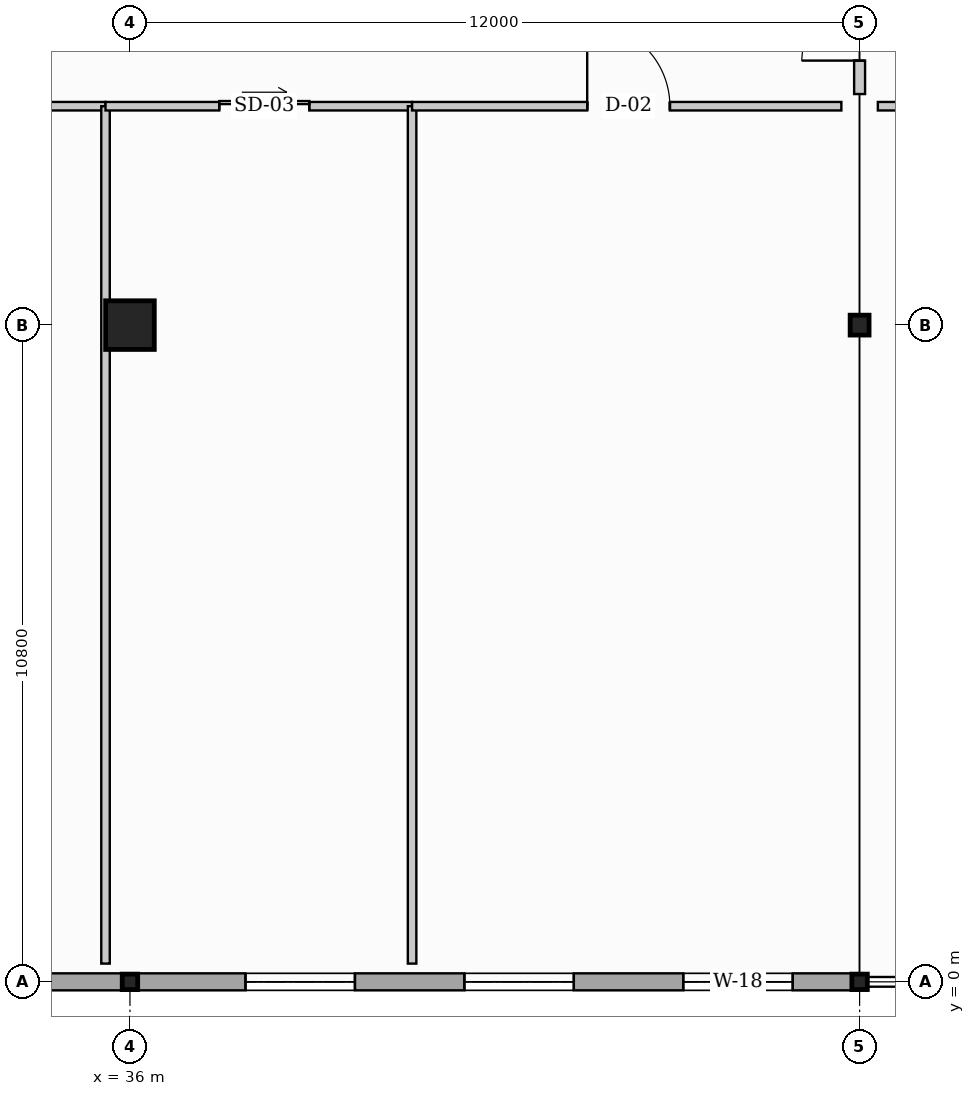
"""IFC4 building model, lengths in metres.
Left out: names, types, materials, properties, quantities, classifications, styles, units other than length and angle.
Written with IfcOpenShell. Run it as: python <this file> out.ifc"""

import sys

from ifc_helpers import new_model, si_unit, direction, frame, frame_2d, origin, origin_2d, place, context, subcontext, project, spatial, rectangle, i_section, extrude, element, fill, save


model = new_model("IFC4")
c1 = context("Model", 3, precision=1e-05, world=origin(), true_north=direction((0.0, 1.0)))
c2 = subcontext(c1, "Body", "Model", "MODEL_VIEW")
j1 = project(units=[si_unit("LENGTHUNIT", "METRE"), si_unit("PLANEANGLEUNIT", "RADIAN")], contexts=[c1])
p1 = place(None, origin())
s1 = spatial("IfcSite", under=j1, at=p1, CompositionType="ELEMENT")
p2 = place(p1, origin())
s2 = spatial("IfcBuilding", under=s1, at=p2, CompositionType="ELEMENT")
p3 = place(p2, origin())
s3 = spatial("IfcBuildingStorey", under=s2, at=p3, CompositionType="ELEMENT", Elevation=0.0)
p4 = place(p3, frame((36.0, 0.0, 0.0), z_axis=(0.0, 0.0, 1.0), x_axis=(0.0, 1.0, 0.0)))
e1 = element("IfcColumn", 1, at=p4, inside=s3, PredefinedType="COLUMN", context=c2, shape_type="SweptSolid", body=[
    extrude(i_section(OverallWidth=0.254, OverallDepth=0.254, WebThickness=0.009, FlangeThickness=0.014, at=origin_2d()), origin(), (0.0, 0.0, 1.0), 4.8),
])
p5 = place(p3, frame((36.0, 10.8, 0.0), z_axis=(0.0, 0.0, 1.0), x_axis=(0.0, 1.0, 0.0)))
e2 = element("IfcColumn", 2, at=p5, inside=s3, PredefinedType="COLUMN", context=c2, shape_type="SweptSolid", body=[
    extrude(rectangle(XDim=0.8, YDim=0.8, at=origin_2d()), origin(), (0.0, 0.0, 1.0), 4.8),
])
p6 = place(p3, frame((48.0, 0.0, 0.0), z_axis=(0.0, 0.0, 1.0), x_axis=(1.0, 0.0, 0.0)))
e3 = element("IfcColumn", 3, at=p6, inside=s3, PredefinedType="COLUMN", context=c2, shape_type="SweptSolid", body=[
    extrude(i_section(OverallWidth=0.254, OverallDepth=0.254, WebThickness=0.009, FlangeThickness=0.014, at=origin_2d()), origin(), (0.0, 0.0, 1.0), 4.8),
])
p7 = place(p3, frame((48.0, 10.8, 0.0), z_axis=(0.0, 0.0, 1.0), x_axis=(1.0, 0.0, 0.0)))
e4 = element("IfcColumn", 4, at=p7, inside=s3, PredefinedType="COLUMN", context=c2, shape_type="SweptSolid", body=[
    extrude(i_section(OverallWidth=0.311, OverallDepth=0.327, WebThickness=0.016, FlangeThickness=0.025, at=origin_2d()), origin(), (0.0, 0.0, 1.0), 4.8),
])
p8 = place(p3, frame((48.0, 0.0, 0.0), z_axis=(0.0, 0.0, 1.0), x_axis=(-1.0, 0.0, 0.0)))
e5 = element("IfcWall", 5, at=p8, inside=s3, PredefinedType="STANDARD", context=c2, shape_type="SweptSolid", body=[
    extrude(rectangle(XDim=48.0, YDim=0.28, at=frame_2d((24.0, 0.0))), origin(), (0.0, 0.0, 1.0), 3.828),
])
p9 = place(p8, frame((1.1, 0.0, 0.95)))
e6 = element("IfcOpeningElement", 6, at=p9, cuts=e5, PredefinedType="OPENING", context=c2, shape_type="SweptSolid", body=[
    extrude(rectangle(XDim=1.8, YDim=0.9, at=frame_2d((0.9, 0.45))), frame((0.0, 0.15, 0.0), z_axis=(0.0, -1.0, 0.0), x_axis=(1.0, 0.0, 0.0)), (0.0, 0.0, 1.0), 0.3),
])
p10 = place(p8, frame((4.7, 0.0, 0.95)))
e7 = element("IfcOpeningElement", 7, at=p10, cuts=e5, PredefinedType="OPENING", context=c2, shape_type="SweptSolid", body=[
    extrude(rectangle(XDim=1.8, YDim=0.9, at=frame_2d((0.9, 0.45))), frame((0.0, 0.15, 0.0), z_axis=(0.0, -1.0, 0.0), x_axis=(1.0, 0.0, 0.0)), (0.0, 0.0, 1.0), 0.3),
])
p11 = place(p8, frame((8.3, 0.0, 0.95)))
e8 = element("IfcOpeningElement", 8, at=p11, cuts=e5, PredefinedType="OPENING", context=c2, shape_type="SweptSolid", body=[
    extrude(rectangle(XDim=1.8, YDim=0.9, at=frame_2d((0.9, 0.45))), frame((0.0, 0.15, 0.0), z_axis=(0.0, -1.0, 0.0), x_axis=(1.0, 0.0, 0.0)), (0.0, 0.0, 1.0), 0.3),
])
p12 = place(p8, frame((15.5, 0.0, 0.95)))
e9 = element("IfcOpeningElement", 9, at=p12, cuts=e5, PredefinedType="OPENING", context=c2, shape_type="SweptSolid", body=[
    extrude(rectangle(XDim=1.8, YDim=0.9, at=frame_2d((0.9, 0.45))), frame((0.0, 0.15, 0.0), z_axis=(0.0, -1.0, 0.0), x_axis=(1.0, 0.0, 0.0)), (0.0, 0.0, 1.0), 0.3),
])
p13 = place(p8, frame((19.1, 0.0, 0.95)))
e10 = element("IfcOpeningElement", 10, at=p13, cuts=e5, PredefinedType="OPENING", context=c2, shape_type="SweptSolid", body=[
    extrude(rectangle(XDim=1.8, YDim=0.9, at=frame_2d((0.9, 0.45))), frame((0.0, 0.15, 0.0), z_axis=(0.0, -1.0, 0.0), x_axis=(1.0, 0.0, 0.0)), (0.0, 0.0, 1.0), 0.3),
])
p14 = place(p8, frame((26.3, 0.0, 0.95)))
e11 = element("IfcOpeningElement", 11, at=p14, cuts=e5, PredefinedType="OPENING", context=c2, shape_type="SweptSolid", body=[
    extrude(rectangle(XDim=1.8, YDim=0.9, at=frame_2d((0.9, 0.45))), frame((0.0, 0.15, 0.0), z_axis=(0.0, -1.0, 0.0), x_axis=(1.0, 0.0, 0.0)), (0.0, 0.0, 1.0), 0.3),
])
p15 = place(p8, frame((29.9, 0.0, 0.95)))
e12 = element("IfcOpeningElement", 12, at=p15, cuts=e5, PredefinedType="OPENING", context=c2, shape_type="SweptSolid", body=[
    extrude(rectangle(XDim=1.8, YDim=0.9, at=frame_2d((0.9, 0.45))), frame((0.0, 0.15, 0.0), z_axis=(0.0, -1.0, 0.0), x_axis=(1.0, 0.0, 0.0)), (0.0, 0.0, 1.0), 0.3),
])
p16 = place(p8, frame((37.1, 0.0, 0.95)))
e13 = element("IfcOpeningElement", 13, at=p16, cuts=e5, PredefinedType="OPENING", context=c2, shape_type="SweptSolid", body=[
    extrude(rectangle(XDim=1.8, YDim=0.9, at=frame_2d((0.9, 0.45))), frame((0.0, 0.15, 0.0), z_axis=(0.0, -1.0, 0.0), x_axis=(1.0, 0.0, 0.0)), (0.0, 0.0, 1.0), 0.3),
])
p17 = place(p8, frame((40.7, 0.0, 0.95)))
e14 = element("IfcOpeningElement", 14, at=p17, cuts=e5, PredefinedType="OPENING", context=c2, shape_type="SweptSolid", body=[
    extrude(rectangle(XDim=1.8, YDim=0.9, at=frame_2d((0.9, 0.45))), frame((0.0, 0.15, 0.0), z_axis=(0.0, -1.0, 0.0), x_axis=(1.0, 0.0, 0.0)), (0.0, 0.0, 1.0), 0.3),
])
p18 = place(p8, frame((44.3, 0.0, 0.95)))
e15 = element("IfcOpeningElement", 15, at=p18, cuts=e5, PredefinedType="OPENING", context=c2, shape_type="SweptSolid", body=[
    extrude(rectangle(XDim=1.8, YDim=0.9, at=frame_2d((0.9, 0.45))), frame((0.0, 0.15, 0.0), z_axis=(0.0, -1.0, 0.0), x_axis=(1.0, 0.0, 0.0)), (0.0, 0.0, 1.0), 0.3),
])
p19 = place(p3, frame((24.504, 14.4, 0.0), z_axis=(0.0, 0.0, 1.0), x_axis=(1.0, 0.0, 0.0)))
e16 = element("IfcWall", 16, at=p19, inside=s3, PredefinedType="PARTITIONING", context=c2, shape_type="SweptSolid", body=[
    extrude(rectangle(XDim=11.094, YDim=0.14, at=frame_2d((5.547, 0.0))), origin(), (0.0, 0.0, 1.0), 4.123),
])
p20 = place(p19, frame((4.897, 0.0, 0.0)))
e17 = element("IfcOpeningElement", 17, at=p20, cuts=e16, PredefinedType="OPENING", context=c2, shape_type="SweptSolid", body=[
    extrude(rectangle(XDim=1.62, YDim=2.3, at=frame_2d((0.81, 1.15))), frame((0.0, 0.08, 0.0), z_axis=(0.0, -1.0, 0.0), x_axis=(1.0, 0.0, 0.0)), (0.0, 0.0, 1.0), 0.16),
])
p21 = place(p3, frame((35.598, 0.3, 0.0), z_axis=(0.0, 0.0, 1.0), x_axis=(0.0, 1.0, 0.0)))
e18 = element("IfcWall", 18, at=p21, inside=s3, PredefinedType="PARTITIONING", context=c2, shape_type="SweptSolid", body=[
    extrude(rectangle(XDim=14.1, YDim=0.14, at=frame_2d((7.05, 0.0))), origin(), (0.0, 0.0, 1.0), 3.823),
])
p22 = place(p3, frame((35.598, 14.4, 0.0), z_axis=(0.0, 0.0, 1.0), x_axis=(1.0, 0.0, 0.0)))
e19 = element("IfcWall", 19, at=p22, inside=s3, PredefinedType="PARTITIONING", context=c2, shape_type="SweptSolid", body=[
    extrude(rectangle(XDim=5.042, YDim=0.14, at=frame_2d((2.521, 0.0))), origin(), (0.0, 0.0, 1.0), 3.97),
])
p23 = place(p22, frame((1.871, 0.0, 0.0)))
e20 = element("IfcOpeningElement", 20, at=p23, cuts=e19, PredefinedType="OPENING", context=c2, shape_type="SweptSolid", body=[
    extrude(rectangle(XDim=1.48, YDim=2.26, at=frame_2d((0.74, 1.13))), frame((0.0, 0.08, 0.0), z_axis=(0.0, -1.0, 0.0), x_axis=(1.0, 0.0, 0.0)), (0.0, 0.0, 1.0), 0.16),
])
p24 = place(p3, frame((40.64, 0.3, 0.0), z_axis=(0.0, 0.0, 1.0), x_axis=(0.0, 1.0, 0.0)))
e21 = element("IfcWall", 21, at=p24, inside=s3, PredefinedType="PARTITIONING", context=c2, shape_type="SweptSolid", body=[
    extrude(rectangle(XDim=14.1, YDim=0.14, at=frame_2d((7.05, 0.0))), origin(), (0.0, 0.0, 1.0), 3.828),
])
p25 = place(p3, frame((40.64, 14.4, 0.0), z_axis=(0.0, 0.0, 1.0), x_axis=(1.0, 0.0, 0.0)))
e22 = element("IfcWall", 22, at=p25, inside=s3, PredefinedType="PARTITIONING", context=c2, shape_type="SweptSolid", body=[
    extrude(rectangle(XDim=7.06, YDim=0.14, at=frame_2d((3.53, 0.0))), origin(), (0.0, 0.0, 1.0), 3.973),
])
p26 = place(p25, frame((2.88, 0.0, 0.0)))
e23 = element("IfcOpeningElement", 23, at=p26, cuts=e22, PredefinedType="OPENING", context=c2, shape_type="SweptSolid", body=[
    extrude(rectangle(XDim=1.36, YDim=2.18, at=frame_2d((0.68, 1.09))), frame((0.0, 0.08, 0.0), z_axis=(0.0, -1.0, 0.0), x_axis=(1.0, 0.0, 0.0)), (0.0, 0.0, 1.0), 0.16),
])
p27 = place(p3, frame((48.0, 14.6, 0.0), z_axis=(0.0, 0.0, 1.0), x_axis=(0.0, 1.0, 0.0)))
e24 = element("IfcWall", 24, at=p27, inside=s3, PredefinedType="PARTITIONING", context=c2, shape_type="SweptSolid", body=[
    extrude(rectangle(XDim=3.0, YDim=0.18, at=frame_2d((1.5, 0.0))), origin(), (0.0, 0.0, 1.0), 3.973),
])
p28 = place(p27, frame((0.55, 0.0, 0.0)))
e25 = element("IfcOpeningElement", 25, at=p28, cuts=e24, PredefinedType="OPENING", context=c2, shape_type="SweptSolid", body=[
    extrude(rectangle(XDim=1.9, YDim=2.25, at=frame_2d((0.95, 1.125))), frame((0.0, 0.1, 0.0), z_axis=(0.0, -1.0, 0.0), x_axis=(1.0, 0.0, 0.0)), (0.0, 0.0, 1.0), 0.2),
])
p29 = place(p3, frame((48.3, 14.4, 0.0), z_axis=(0.0, 0.0, 1.0), x_axis=(1.0, 0.0, 0.0)))
e26 = element("IfcWall", 26, at=p29, inside=s3, PredefinedType="PARTITIONING", context=c2, shape_type="SweptSolid", body=[
    extrude(rectangle(XDim=18.765, YDim=0.14, at=frame_2d((9.382, 0.0))), origin(), (0.0, 0.0, 1.0), 3.973),
])
p30 = place(p29, frame((0.32, 0.0, 0.0)))
e27 = element("IfcOpeningElement", 27, at=p30, cuts=e26, PredefinedType="OPENING", context=c2, shape_type="SweptSolid", body=[
    extrude(rectangle(XDim=1.02, YDim=2.08, at=frame_2d((0.51, 1.04))), frame((0.0, 0.08, 0.0), z_axis=(0.0, -1.0, 0.0), x_axis=(1.0, 0.0, 0.0)), (0.0, 0.0, 1.0), 0.16),
])
p31 = place(p9, origin())
e28 = element("IfcWindow", 28, at=p31, inside=s3, PartitioningType="DOUBLE_PANEL_HORIZONTAL", PredefinedType="WINDOW", context=c2, shape_type="SweptSolid", body=[
    extrude(rectangle(XDim=1.8, YDim=0.9, at=frame_2d((0.9, 0.45))), frame((0.0, 0.03, 0.0), z_axis=(0.0, -1.0, 0.0), x_axis=(1.0, 0.0, 0.0)), (0.0, 0.0, 1.0), 0.06),
])
fill(e6, e28)
p32 = place(p10, origin())
e29 = element("IfcWindow", 29, at=p32, inside=s3, PartitioningType="DOUBLE_PANEL_HORIZONTAL", PredefinedType="WINDOW", context=c2, shape_type="SweptSolid", body=[
    extrude(rectangle(XDim=1.8, YDim=0.9, at=frame_2d((0.9, 0.45))), frame((0.0, 0.03, 0.0), z_axis=(0.0, -1.0, 0.0), x_axis=(1.0, 0.0, 0.0)), (0.0, 0.0, 1.0), 0.06),
])
fill(e7, e29)
p33 = place(p11, origin())
e30 = element("IfcWindow", 30, at=p33, inside=s3, PartitioningType="DOUBLE_PANEL_HORIZONTAL", PredefinedType="WINDOW", context=c2, shape_type="SweptSolid", body=[
    extrude(rectangle(XDim=1.8, YDim=0.9, at=frame_2d((0.9, 0.45))), frame((0.0, 0.03, 0.0), z_axis=(0.0, -1.0, 0.0), x_axis=(1.0, 0.0, 0.0)), (0.0, 0.0, 1.0), 0.06),
])
fill(e8, e30)
p34 = place(p23, origin())
e31 = element("IfcDoor", 31, at=p34, inside=s3, OperationType="SLIDING_TO_LEFT", PredefinedType="DOOR", context=c2, shape_type="SweptSolid", body=[
    extrude(rectangle(XDim=1.48, YDim=2.26, at=frame_2d((0.74, 1.13))), frame((0.0, 0.025, 0.0), z_axis=(0.0, -1.0, 0.0), x_axis=(1.0, 0.0, 0.0)), (0.0, 0.0, 1.0), 0.05),
])
fill(e20, e31)
p35 = place(p26, origin())
e32 = element("IfcDoor", 32, at=p35, inside=s3, OperationType="SINGLE_SWING_LEFT", PredefinedType="DOOR", context=c2, shape_type="SweptSolid", body=[
    extrude(rectangle(XDim=1.36, YDim=2.18, at=frame_2d((0.68, 1.09))), frame((0.0, 0.025, 0.0), z_axis=(0.0, -1.0, 0.0), x_axis=(1.0, 0.0, 0.0)), (0.0, 0.0, 1.0), 0.05),
])
fill(e23, e32)
p36 = place(p28, origin())
e33 = element("IfcDoor", 33, at=p36, inside=s3, OperationType="DOUBLE_DOOR_SINGLE_SWING", PredefinedType="DOOR", context=c2, shape_type="SweptSolid", body=[
    extrude(rectangle(XDim=1.9, YDim=2.25, at=frame_2d((0.95, 1.125))), frame((0.0, 0.025, 0.0), z_axis=(0.0, -1.0, 0.0), x_axis=(1.0, 0.0, 0.0)), (0.0, 0.0, 1.0), 0.05),
])
fill(e25, e33)
save(model, sys.argv[1])
